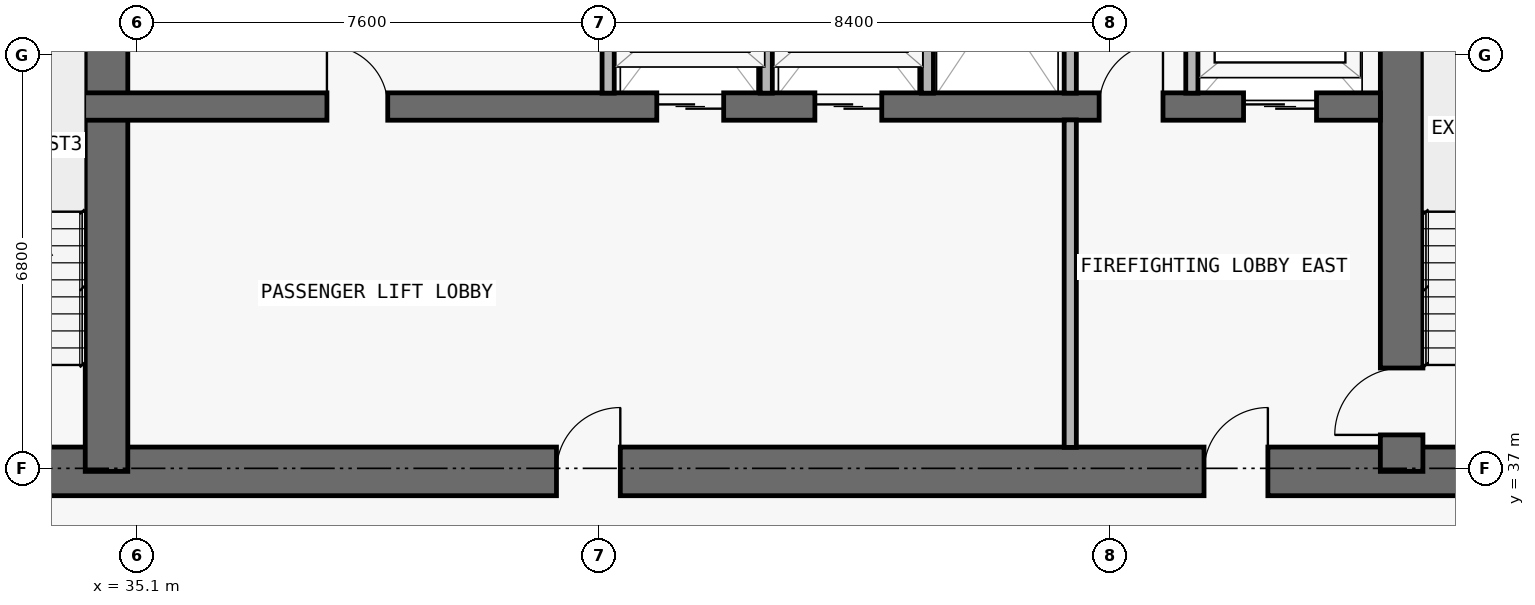
"""IFC4 building model, lengths in metres.
Left out: names, types, materials, properties, quantities, classifications, styles, units other than length and angle.
Written with IfcOpenShell. Run it as: python <this file> out.ifc"""

import sys

from ifc_helpers import new_model, si_unit, direction, frame, frame_2d, origin, place, context, subcontext, project, spatial, rectangle, extrude, element, fill, save


model = new_model("IFC4")
c1 = context("Model", 3, precision=1e-05, world=origin(), true_north=direction((0.0, 1.0)))
c2 = subcontext(c1, "Body", "Model", "MODEL_VIEW")
j1 = project(units=[si_unit("LENGTHUNIT", "METRE"), si_unit("PLANEANGLEUNIT", "RADIAN")], contexts=[c1])
p1 = place(None, origin())
s1 = spatial("IfcSite", under=j1, at=p1, CompositionType="ELEMENT")
p2 = place(p1, origin())
s2 = spatial("IfcBuilding", under=s1, at=p2, CompositionType="ELEMENT")
p3 = place(p2, frame((0.0, 0.0, 125.7)))
s3 = spatial("IfcBuildingStorey", under=s2, at=p3, CompositionType="ELEMENT", Elevation=125.7)
p4 = place(p3, frame((17.85, 36.95, 0.0), z_axis=(0.0, 0.0, 1.0), x_axis=(1.0, 0.0, 0.0)))
e1 = element("IfcWall", 1, at=p4, inside=s3, PredefinedType="SHEAR", context=c2, shape_type="SweptSolid", body=[
    extrude(rectangle(XDim=42.1, YDim=0.8, at=frame_2d((21.05, 0.0))), origin(), (0.0, 0.0, 1.0), 3.05),
])
p5 = place(p4, frame((14.45, 0.0, 0.0)))
e2 = element("IfcOpeningElement", 2, at=p5, cuts=e1, PredefinedType="OPENING", context=c2, shape_type="SweptSolid", body=[
    extrude(rectangle(XDim=1.1, YDim=2.15, at=frame_2d((0.55, 1.075))), frame((0.0, 0.41, 0.0), z_axis=(0.0, -1.0, 0.0), x_axis=(1.0, 0.0, 0.0)), (0.0, 0.0, 1.0), 0.82),
])
p6 = place(p4, frame((6.3, 0.0, 0.0)))
e3 = element("IfcOpeningElement", 3, at=p6, cuts=e1, PredefinedType="OPENING", context=c2, shape_type="SweptSolid", body=[
    extrude(rectangle(XDim=1.05, YDim=2.15, at=frame_2d((0.525, 1.075))), frame((0.0, 0.41, 0.0), z_axis=(0.0, -1.0, 0.0), x_axis=(1.0, 0.0, 0.0)), (0.0, 0.0, 1.0), 0.82),
])
p7 = place(p4, frame((34.8, 0.0, 0.0)))
e4 = element("IfcOpeningElement", 4, at=p7, cuts=e1, PredefinedType="OPENING", context=c2, shape_type="SweptSolid", body=[
    extrude(rectangle(XDim=1.05, YDim=2.15, at=frame_2d((0.525, 1.075))), frame((0.0, 0.41, 0.0), z_axis=(0.0, -1.0, 0.0), x_axis=(1.0, 0.0, 0.0)), (0.0, 0.0, 1.0), 0.82),
])
p8 = place(p4, frame((10.913, 0.0, 0.0)))
e5 = element("IfcOpeningElement", 5, at=p8, cuts=e1, PredefinedType="OPENING", context=c2, shape_type="SweptSolid", body=[
    extrude(rectangle(XDim=1.05, YDim=2.15, at=frame_2d((0.525, 1.075))), frame((0.0, 0.41, 0.0), z_axis=(0.0, -1.0, 0.0), x_axis=(1.0, 0.0, 0.0)), (0.0, 0.0, 1.0), 0.82),
])
p9 = place(p4, frame((24.15, 0.0, 0.0)))
e6 = element("IfcOpeningElement", 6, at=p9, cuts=e1, PredefinedType="OPENING", context=c2, shape_type="SweptSolid", body=[
    extrude(rectangle(XDim=1.05, YDim=2.15, at=frame_2d((0.525, 1.075))), frame((0.0, 0.41, 0.0), z_axis=(0.0, -1.0, 0.0), x_axis=(1.0, 0.0, 0.0)), (0.0, 0.0, 1.0), 0.82),
])
p10 = place(p3, frame((55.9, 36.95, 0.0), z_axis=(0.0, 0.0, 1.0), x_axis=(0.0, 1.0, 0.0)))
e7 = element("IfcWall", 7, at=p10, inside=s3, PredefinedType="SHEAR", context=c2, shape_type="SweptSolid", body=[
    extrude(rectangle(XDim=9.625, YDim=0.7, at=frame_2d((4.812, 0.0))), origin(), (0.0, 0.0, 1.0), 3.05),
])
p11 = place(p10, frame((0.6, 0.0, 0.0)))
e8 = element("IfcOpeningElement", 8, at=p11, cuts=e7, PredefinedType="OPENING", context=c2, shape_type="SweptSolid", body=[
    extrude(rectangle(XDim=1.1, YDim=2.15, at=frame_2d((0.55, 1.075))), frame((0.0, 0.36, 0.0), z_axis=(0.0, -1.0, 0.0), x_axis=(1.0, 0.0, 0.0)), (0.0, 0.0, 1.0), 0.72),
])
p12 = place(p3, frame((34.6, 36.95, 0.0), z_axis=(0.0, 0.0, 1.0), x_axis=(0.0, 1.0, 0.0)))
e9 = element("IfcWall", 9, at=p12, inside=s3, PredefinedType="SHEAR", context=c2, shape_type="SweptSolid", body=[
    extrude(rectangle(XDim=9.625, YDim=0.7, at=frame_2d((4.812, 0.0))), origin(), (0.0, 0.0, 1.0), 3.05),
])
p13 = place(p3, frame((22.25, 42.95, 0.0), z_axis=(0.0, 0.0, 1.0), x_axis=(1.0, 0.0, 0.0)))
e10 = element("IfcWall", 10, at=p13, inside=s3, PredefinedType="SHEAR", context=c2, shape_type="SweptSolid", body=[
    extrude(rectangle(XDim=33.3, YDim=0.45, at=frame_2d((16.65, 0.0))), origin(), (0.0, 0.0, 1.0), 3.05),
])
p14 = place(p13, frame((1.05, 0.0, 0.0)))
e11 = element("IfcOpeningElement", 11, at=p14, cuts=e10, PredefinedType="OPENING", context=c2, shape_type="SweptSolid", body=[
    extrude(rectangle(XDim=1.2, YDim=2.2, at=frame_2d((0.6, 1.1))), frame((0.0, 0.235, 0.0), z_axis=(0.0, -1.0, 0.0), x_axis=(1.0, 0.0, 0.0)), (0.0, 0.0, 1.0), 0.47),
])
p15 = place(p13, frame((31.05, 0.0, 0.0)))
e12 = element("IfcOpeningElement", 12, at=p15, cuts=e10, PredefinedType="OPENING", context=c2, shape_type="SweptSolid", body=[
    extrude(rectangle(XDim=1.2, YDim=2.2, at=frame_2d((0.6, 1.1))), frame((0.0, 0.235, 0.0), z_axis=(0.0, -1.0, 0.0), x_axis=(1.0, 0.0, 0.0)), (0.0, 0.0, 1.0), 0.47),
])
p16 = place(p13, frame((21.4, 0.0, 0.0)))
e13 = element("IfcOpeningElement", 13, at=p16, cuts=e10, PredefinedType="OPENING", context=c2, shape_type="SweptSolid", body=[
    extrude(rectangle(XDim=1.1, YDim=2.2, at=frame_2d((0.55, 1.1))), frame((0.0, 0.235, 0.0), z_axis=(0.0, -1.0, 0.0), x_axis=(1.0, 0.0, 0.0)), (0.0, 0.0, 1.0), 0.47),
])
p17 = place(p13, frame((24.0, 0.0, 0.0)))
e14 = element("IfcOpeningElement", 14, at=p17, cuts=e10, PredefinedType="OPENING", context=c2, shape_type="SweptSolid", body=[
    extrude(rectangle(XDim=1.1, YDim=2.2, at=frame_2d((0.55, 1.1))), frame((0.0, 0.235, 0.0), z_axis=(0.0, -1.0, 0.0), x_axis=(1.0, 0.0, 0.0)), (0.0, 0.0, 1.0), 0.47),
])
p18 = place(p13, frame((3.625, 0.0, 0.0)))
e15 = element("IfcOpeningElement", 15, at=p18, cuts=e10, PredefinedType="OPENING", context=c2, shape_type="SweptSolid", body=[
    extrude(rectangle(XDim=1.05, YDim=2.15, at=frame_2d((0.525, 1.075))), frame((0.0, 0.235, 0.0), z_axis=(0.0, -1.0, 0.0), x_axis=(1.0, 0.0, 0.0)), (0.0, 0.0, 1.0), 0.47),
])
p19 = place(p13, frame((28.675, 0.0, 0.0)))
e16 = element("IfcOpeningElement", 16, at=p19, cuts=e10, PredefinedType="OPENING", context=c2, shape_type="SweptSolid", body=[
    extrude(rectangle(XDim=1.05, YDim=2.15, at=frame_2d((0.525, 1.075))), frame((0.0, 0.235, 0.0), z_axis=(0.0, -1.0, 0.0), x_axis=(1.0, 0.0, 0.0)), (0.0, 0.0, 1.0), 0.47),
])
p20 = place(p13, frame((15.975, 0.0, 0.0)))
e17 = element("IfcOpeningElement", 17, at=p20, cuts=e10, PredefinedType="OPENING", context=c2, shape_type="SweptSolid", body=[
    extrude(rectangle(XDim=1.0, YDim=2.2, at=frame_2d((0.5, 1.1))), frame((0.0, 0.235, 0.0), z_axis=(0.0, -1.0, 0.0), x_axis=(1.0, 0.0, 0.0)), (0.0, 0.0, 1.0), 0.47),
])
for number, where, z_axis, x_axis in (
    (18, (42.85, 43.17, 0.0), (0.0, 0.0, 1.0), (0.0, 1.0, 0.0)),
    (19, (45.45, 43.17, 0.0), (0.0, 0.0, 1.0), (0.0, 1.0, 0.0)),
    (20, (48.1, 43.17, 0.0), (0.0, 0.0, 1.0), (0.0, 1.0, 0.0)),
):
    element("IfcWall", number, at=place(p3, frame(where, z_axis=z_axis, x_axis=x_axis)), inside=s3, PredefinedType="PARTITIONING", context=c2, shape_type="SweptSolid", body=[
        extrude(rectangle(XDim=3.185, YDim=0.2, at=frame_2d((1.593, 0.0))), origin(), (0.0, 0.0, 1.0), 3.05),
    ])
p21 = place(p3, frame((50.45, 37.345, 0.0), z_axis=(0.0, 0.0, 1.0), x_axis=(0.0, 1.0, 0.0)))
e21 = element("IfcWall", 21, at=p21, inside=s3, PredefinedType="PARTITIONING", context=c2, shape_type="SweptSolid", body=[
    extrude(rectangle(XDim=5.385, YDim=0.2, at=frame_2d((2.692, 0.0))), origin(), (0.0, 0.0, 1.0), 3.05),
])
for number, where, z_axis, x_axis in (
    (22, (50.45, 43.17, 0.0), (0.0, 0.0, 1.0), (0.0, 1.0, 0.0)),
    (23, (52.45, 43.17, 0.0), (0.0, 0.0, 1.0), (0.0, 1.0, 0.0)),
):
    element("IfcWall", number, at=place(p3, frame(where, z_axis=z_axis, x_axis=x_axis)), inside=s3, PredefinedType="PARTITIONING", context=c2, shape_type="SweptSolid", body=[
        extrude(rectangle(XDim=3.185, YDim=0.2, at=frame_2d((1.593, 0.0))), origin(), (0.0, 0.0, 1.0), 3.05),
    ])
p22 = place(p15, origin())
e24 = element("IfcDoor", 24, at=p22, inside=s3, OperationType="DOUBLE_DOOR_SLIDING", PredefinedType="DOOR", context=c2, shape_type="SweptSolid", body=[
    extrude(rectangle(XDim=1.2, YDim=2.2, at=frame_2d((0.6, 1.1))), frame((0.0, 0.025, 0.0), z_axis=(0.0, -1.0, 0.0), x_axis=(1.0, 0.0, 0.0)), (0.0, 0.0, 1.0), 0.05),
])
fill(e12, e24)
p23 = place(p16, origin())
e25 = element("IfcDoor", 25, at=p23, inside=s3, OperationType="DOUBLE_DOOR_SLIDING", PredefinedType="DOOR", context=c2, shape_type="SweptSolid", body=[
    extrude(rectangle(XDim=1.1, YDim=2.2, at=frame_2d((0.55, 1.1))), frame((0.0, 0.025, 0.0), z_axis=(0.0, -1.0, 0.0), x_axis=(1.0, 0.0, 0.0)), (0.0, 0.0, 1.0), 0.05),
])
fill(e13, e25)
p24 = place(p17, origin())
e26 = element("IfcDoor", 26, at=p24, inside=s3, OperationType="DOUBLE_DOOR_SLIDING", PredefinedType="DOOR", context=c2, shape_type="SweptSolid", body=[
    extrude(rectangle(XDim=1.1, YDim=2.2, at=frame_2d((0.55, 1.1))), frame((0.0, 0.025, 0.0), z_axis=(0.0, -1.0, 0.0), x_axis=(1.0, 0.0, 0.0)), (0.0, 0.0, 1.0), 0.05),
])
fill(e14, e26)
p25 = place(p7, origin())
e27 = element("IfcDoor", 27, at=p25, inside=s3, OperationType="SINGLE_SWING_RIGHT", PredefinedType="DOOR", context=c2, shape_type="SweptSolid", body=[
    extrude(rectangle(XDim=1.05, YDim=2.15, at=frame_2d((0.525, 1.075))), frame((0.0, 0.025, 0.0), z_axis=(0.0, -1.0, 0.0), x_axis=(1.0, 0.0, 0.0)), (0.0, 0.0, 1.0), 0.05),
])
fill(e4, e27)
p26 = place(p11, origin())
e28 = element("IfcDoor", 28, at=p26, inside=s3, OperationType="SINGLE_SWING_LEFT", PredefinedType="DOOR", context=c2, shape_type="SweptSolid", body=[
    extrude(rectangle(XDim=1.1, YDim=2.15, at=frame_2d((0.55, 1.075))), frame((0.0, 0.025, 0.0), z_axis=(0.0, -1.0, 0.0), x_axis=(1.0, 0.0, 0.0)), (0.0, 0.0, 1.0), 0.05),
])
fill(e8, e28)
p27 = place(p19, origin())
e29 = element("IfcDoor", 29, at=p27, inside=s3, OperationType="SINGLE_SWING_RIGHT", PredefinedType="DOOR", context=c2, shape_type="SweptSolid", body=[
    extrude(rectangle(XDim=1.05, YDim=2.15, at=frame_2d((0.525, 1.075))), frame((0.0, 0.025, 0.0), z_axis=(0.0, -1.0, 0.0), x_axis=(1.0, 0.0, 0.0)), (0.0, 0.0, 1.0), 0.05),
])
fill(e16, e29)
p28 = place(p9, origin())
e30 = element("IfcDoor", 30, at=p28, inside=s3, OperationType="SINGLE_SWING_RIGHT", PredefinedType="DOOR", context=c2, shape_type="SweptSolid", body=[
    extrude(rectangle(XDim=1.05, YDim=2.15, at=frame_2d((0.525, 1.075))), frame((0.0, 0.025, 0.0), z_axis=(0.0, -1.0, 0.0), x_axis=(1.0, 0.0, 0.0)), (0.0, 0.0, 1.0), 0.05),
])
fill(e6, e30)
p29 = place(p20, origin())
e31 = element("IfcDoor", 31, at=p29, inside=s3, OperationType="SINGLE_SWING_LEFT", PredefinedType="DOOR", context=c2, shape_type="SweptSolid", body=[
    extrude(rectangle(XDim=1.0, YDim=2.2, at=frame_2d((0.5, 1.1))), frame((0.0, 0.025, 0.0), z_axis=(0.0, -1.0, 0.0), x_axis=(1.0, 0.0, 0.0)), (0.0, 0.0, 1.0), 0.05),
])
fill(e17, e31)
save(model, sys.argv[1])
